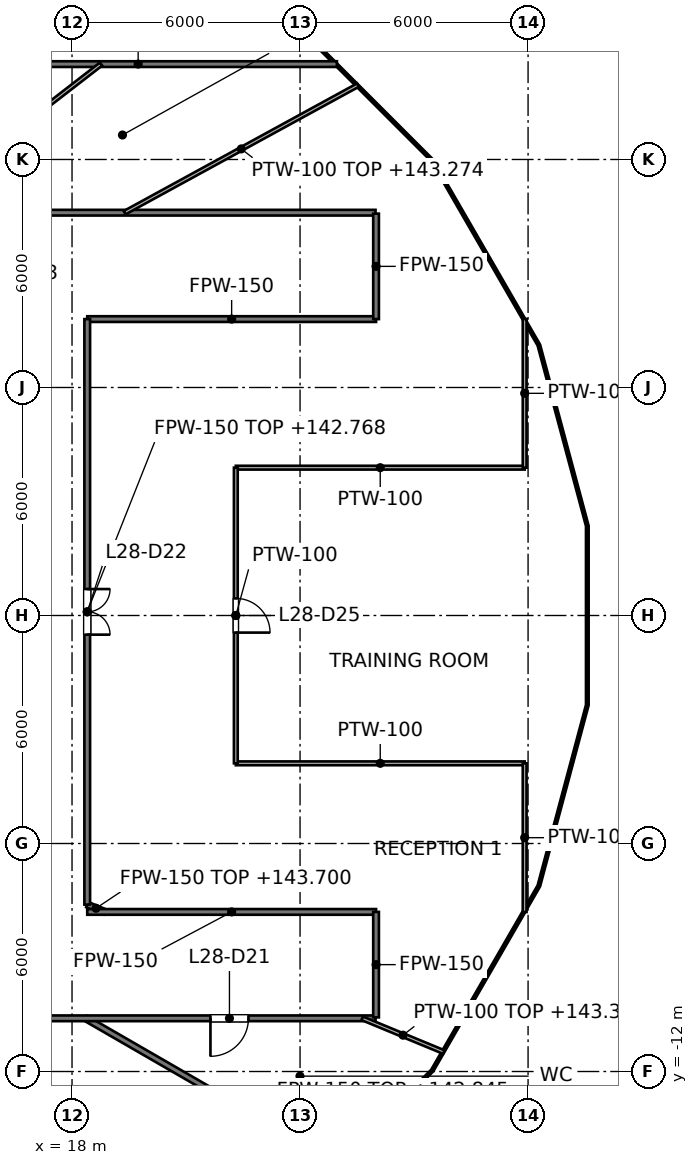
"""IFC4 building model, lengths in metres.
Left out: names, types, materials, properties, quantities, classifications, styles, units other than length and angle.
Written with IfcOpenShell. Run it as: python <this file> out.ifc"""

import sys

from ifc_helpers import new_model, si_unit, direction, frame, frame_2d, origin, place, context, subcontext, project, spatial, rectangle, extrude, element, fill, save


model = new_model("IFC4")
c1 = context("Model", 3, precision=1e-05, world=origin(), true_north=direction((0.0, 1.0)))
c2 = subcontext(c1, "Body", "Model", "MODEL_VIEW")
j1 = project(units=[si_unit("LENGTHUNIT", "METRE"), si_unit("PLANEANGLEUNIT", "RADIAN")], contexts=[c1])
p1 = place(None, origin())
s1 = spatial("IfcSite", under=j1, at=p1, CompositionType="ELEMENT")
p2 = place(p1, origin())
s2 = spatial("IfcBuilding", under=s1, at=p2, CompositionType="ELEMENT")
p3 = place(p2, frame((0.0, 0.0, 139.8)))
s3 = spatial("IfcBuildingStorey", under=s2, at=p3, CompositionType="ELEMENT", Elevation=139.8)
p4 = place(p3, frame((18.359, -10.6, 0.0), z_axis=(0.0, 0.0, 1.0), x_axis=(0.866036201792, -0.499981296836, 0.0)))
e1 = element("IfcWall", 1, at=p4, inside=s3, PredefinedType="PARTITIONING", context=c2, shape_type="SweptSolid", body=[
    extrude(rectangle(XDim=7.702, YDim=0.15, at=frame_2d((3.851, 0.0))), origin(), (0.0, 0.0, 1.0), 3.045),
])
p5 = place(p3, frame((18.4, -7.608, 0.0), z_axis=(0.0, 0.0, 1.0), x_axis=(0.923666464005, -0.383197420755, 0.0)))
e2 = element("IfcWall", 2, at=p5, inside=s3, PredefinedType="PARTITIONING", context=c2, shape_type="SweptSolid", body=[
    extrude(rectangle(XDim=0.501, YDim=0.15, at=frame_2d((0.251, 0.0))), origin(), (0.0, 0.0, 1.0), 3.9),
])
p6 = place(p3, frame((-25.986, -10.6, 0.0), z_axis=(0.0, 0.0, 1.0), x_axis=(1.0, 0.0, 0.0)))
e3 = element("IfcWall", 3, at=p6, inside=s3, PredefinedType="PARTITIONING", context=c2, shape_type="SweptSolid", body=[
    extrude(rectangle(XDim=51.972, YDim=0.15, at=frame_2d((25.986, 0.0))), origin(), (0.0, 0.0, 1.0), 2.968),
])
p7 = place(p6, frame((47.628, 0.0, 0.0)))
e4 = element("IfcOpeningElement", 4, at=p7, cuts=e3, PredefinedType="OPENING", context=c2, shape_type="SweptSolid", body=[
    extrude(rectangle(XDim=1.0, YDim=2.1, at=frame_2d((0.5, 1.05))), frame((0.0, 0.075, 0.0), z_axis=(0.0, -1.0, 0.0), x_axis=(1.0, 0.0, 0.0)), (0.0, 0.0, 1.0), 0.15),
])
p8 = place(p6, frame((5.312, 0.0, 0.0)))
e5 = element("IfcOpeningElement", 5, at=p8, cuts=e3, PredefinedType="OPENING", context=c2, shape_type="SweptSolid", body=[
    extrude(rectangle(XDim=1.0, YDim=2.1, at=frame_2d((0.5, 1.05))), frame((0.0, 0.075, 0.0), z_axis=(0.0, -1.0, 0.0), x_axis=(1.0, 0.0, 0.0)), (0.0, 0.0, 1.0), 0.15),
])
p9 = place(p6, frame((14.924, 0.0, 0.0)))
e6 = element("IfcOpeningElement", 6, at=p9, cuts=e3, PredefinedType="OPENING", context=c2, shape_type="SweptSolid", body=[
    extrude(rectangle(XDim=1.0, YDim=2.1, at=frame_2d((0.5, 1.05))), frame((0.0, 0.075, 0.0), z_axis=(0.0, -1.0, 0.0), x_axis=(1.0, 0.0, 0.0)), (0.0, 0.0, 1.0), 0.15),
])
p10 = place(p6, frame((22.156, 0.0, 0.0)))
e7 = element("IfcOpeningElement", 7, at=p10, cuts=e3, PredefinedType="OPENING", context=c2, shape_type="SweptSolid", body=[
    extrude(rectangle(XDim=1.0, YDim=2.1, at=frame_2d((0.5, 1.05))), frame((0.0, 0.075, 0.0), z_axis=(0.0, -1.0, 0.0), x_axis=(1.0, 0.0, 0.0)), (0.0, 0.0, 1.0), 0.15),
])
p11 = place(p6, frame((27.795, 0.0, 0.0)))
e8 = element("IfcOpeningElement", 8, at=p11, cuts=e3, PredefinedType="OPENING", context=c2, shape_type="SweptSolid", body=[
    extrude(rectangle(XDim=1.0, YDim=2.1, at=frame_2d((0.5, 1.05))), frame((0.0, 0.075, 0.0), z_axis=(0.0, -1.0, 0.0), x_axis=(1.0, 0.0, 0.0)), (0.0, 0.0, 1.0), 0.15),
])
p12 = place(p6, frame((37.045, 0.0, 0.0)))
e9 = element("IfcOpeningElement", 9, at=p12, cuts=e3, PredefinedType="OPENING", context=c2, shape_type="SweptSolid", body=[
    extrude(rectangle(XDim=1.0, YDim=2.1, at=frame_2d((0.5, 1.05))), frame((0.0, 0.075, 0.0), z_axis=(0.0, -1.0, 0.0), x_axis=(1.0, 0.0, 0.0)), (0.0, 0.0, 1.0), 0.15),
])
for number, where, z_axis, x_axis in (
    (10, (18.4, -7.8, 0.0), (0.0, 0.0, 1.0), (1.0, 0.0, 0.0)),
    (11, (18.4, 7.8, 0.0), (0.0, 0.0, 1.0), (1.0, 0.0, 0.0)),
):
    element("IfcWall", number, at=place(p3, frame(where, z_axis=z_axis, x_axis=x_axis)), inside=s3, PredefinedType="PARTITIONING", context=c2, shape_type="SweptSolid", body=[
        extrude(rectangle(XDim=7.6, YDim=0.15, at=frame_2d((3.8, 0.0))), origin(), (0.0, 0.0, 1.0), 2.977),
    ])
p13 = place(p3, frame((-25.986, 10.6, 0.0), z_axis=(0.0, 0.0, 1.0), x_axis=(1.0, 0.0, 0.0)))
e12 = element("IfcWall", 12, at=p13, inside=s3, PredefinedType="PARTITIONING", context=c2, shape_type="SweptSolid", body=[
    extrude(rectangle(XDim=51.972, YDim=0.15, at=frame_2d((25.986, 0.0))), origin(), (0.0, 0.0, 1.0), 2.968),
])
p14 = place(p13, frame((42.031, 0.0, 0.0)))
e13 = element("IfcOpeningElement", 13, at=p14, cuts=e12, PredefinedType="OPENING", context=c2, shape_type="SweptSolid", body=[
    extrude(rectangle(XDim=1.0, YDim=2.1, at=frame_2d((0.5, 1.05))), frame((0.0, 0.075, 0.0), z_axis=(0.0, -1.0, 0.0), x_axis=(1.0, 0.0, 0.0)), (0.0, 0.0, 1.0), 0.15),
])
p15 = place(p13, frame((37.69, 0.0, 0.0)))
e14 = element("IfcOpeningElement", 14, at=p15, cuts=e12, PredefinedType="OPENING", context=c2, shape_type="SweptSolid", body=[
    extrude(rectangle(XDim=1.0, YDim=2.1, at=frame_2d((0.5, 1.05))), frame((0.0, 0.075, 0.0), z_axis=(0.0, -1.0, 0.0), x_axis=(1.0, 0.0, 0.0)), (0.0, 0.0, 1.0), 0.15),
])
p16 = place(p13, frame((32.156, 0.0, 0.0)))
e15 = element("IfcOpeningElement", 15, at=p16, cuts=e12, PredefinedType="OPENING", context=c2, shape_type="SweptSolid", body=[
    extrude(rectangle(XDim=1.0, YDim=2.1, at=frame_2d((0.5, 1.05))), frame((0.0, 0.075, 0.0), z_axis=(0.0, -1.0, 0.0), x_axis=(1.0, 0.0, 0.0)), (0.0, 0.0, 1.0), 0.15),
])
p17 = place(p13, frame((23.896, 0.0, 0.0)))
e16 = element("IfcOpeningElement", 16, at=p17, cuts=e12, PredefinedType="OPENING", context=c2, shape_type="SweptSolid", body=[
    extrude(rectangle(XDim=1.0, YDim=2.1, at=frame_2d((0.5, 1.05))), frame((0.0, 0.075, 0.0), z_axis=(0.0, -1.0, 0.0), x_axis=(1.0, 0.0, 0.0)), (0.0, 0.0, 1.0), 0.15),
])
p18 = place(p13, frame((13.126, 0.0, 0.0)))
e17 = element("IfcOpeningElement", 17, at=p18, cuts=e12, PredefinedType="OPENING", context=c2, shape_type="SweptSolid", body=[
    extrude(rectangle(XDim=1.2, YDim=2.1, at=frame_2d((0.6, 1.05))), frame((0.0, 0.075, 0.0), z_axis=(0.0, -1.0, 0.0), x_axis=(1.0, 0.0, 0.0)), (0.0, 0.0, 1.0), 0.15),
])
p19 = place(p3, frame((14.51, 14.51, 0.0), z_axis=(0.0, 0.0, 1.0), x_axis=(1.0, 0.0, 0.0)))
e18 = element("IfcWall", 18, at=p19, inside=s3, PredefinedType="PARTITIONING", context=c2, shape_type="SweptSolid", body=[
    extrude(rectangle(XDim=10.46, YDim=0.15, at=frame_2d((5.23, 0.0))), origin(), (0.0, 0.0, 1.0), 2.968),
])
for number, where, z_axis, x_axis in (
    (19, (26.0, -10.575, 0.0), (0.0, 0.0, 1.0), (0.0, 1.0, 0.0)),
    (20, (26.0, 7.8, 0.0), (0.0, 0.0, 1.0), (0.0, 1.0, 0.0)),
):
    element("IfcWall", number, at=place(p3, frame(where, z_axis=z_axis, x_axis=x_axis)), inside=s3, PredefinedType="PARTITIONING", context=c2, shape_type="SweptSolid", body=[
        extrude(rectangle(XDim=2.775, YDim=0.15, at=frame_2d((1.387, 0.0))), origin(), (0.0, 0.0, 1.0), 2.977),
    ])
p20 = place(p3, frame((18.4, -7.608, 0.0), z_axis=(0.0, 0.0, 1.0), x_axis=(0.0, 1.0, 0.0)))
e21 = element("IfcWall", 21, at=p20, inside=s3, PredefinedType="PARTITIONING", context=c2, shape_type="SweptSolid", body=[
    extrude(rectangle(XDim=15.408, YDim=0.15, at=frame_2d((7.704, 0.0))), origin(), (0.0, 0.0, 1.0), 2.968),
])
p21 = place(p20, frame((7.104, 0.0, 0.0)))
e22 = element("IfcOpeningElement", 22, at=p21, cuts=e21, PredefinedType="OPENING", context=c2, shape_type="SweptSolid", body=[
    extrude(rectangle(XDim=1.2, YDim=2.1, at=frame_2d((0.6, 1.05))), frame((0.0, 0.075, 0.0), z_axis=(0.0, -1.0, 0.0), x_axis=(1.0, 0.0, 0.0)), (0.0, 0.0, 1.0), 0.15),
])
p22 = place(p3, frame((25.635, -10.6, 0.0), z_axis=(0.0, 0.0, 1.0), x_axis=(0.924087226733, -0.382181628796, 0.0)))
e23 = element("IfcWall", 23, at=p22, inside=s3, PredefinedType="PARTITIONING", context=c2, shape_type="SweptSolid", body=[
    extrude(rectangle(XDim=2.323, YDim=0.1, at=frame_2d((1.162, 0.0))), origin(), (0.0, 0.0, 1.0), 3.525),
])
for number, where, z_axis, x_axis in (
    (24, (22.31, -3.89, 0.0), (0.0, 0.0, 1.0), (1.0, 0.0, 0.0)),
    (25, (22.31, 3.89, 0.0), (0.0, 0.0, 1.0), (1.0, 0.0, 0.0)),
):
    element("IfcWall", number, at=place(p3, frame(where, z_axis=z_axis, x_axis=x_axis)), inside=s3, PredefinedType="PARTITIONING", context=c2, shape_type="SweptSolid", body=[
        extrude(rectangle(XDim=7.6, YDim=0.1, at=frame_2d((3.8, 0.0))), origin(), (0.0, 0.0, 1.0), 2.968),
    ])
p23 = place(p3, frame((19.384, 10.6, 0.0), z_axis=(0.0, 0.0, 1.0), x_axis=(0.877388352769, 0.479780865006, 0.0)))
e26 = element("IfcWall", 26, at=p23, inside=s3, PredefinedType="PARTITIONING", context=c2, shape_type="SweptSolid", body=[
    extrude(rectangle(XDim=6.997, YDim=0.1, at=frame_2d((3.499, 0.0))), origin(), (0.0, 0.0, 1.0), 3.474),
])
p24 = place(p3, frame((13.707, 10.6, 0.0), z_axis=(0.0, 0.0, 1.0), x_axis=(0.791052244704, 0.611748597177, 0.0)))
e27 = element("IfcWall", 27, at=p24, inside=s3, PredefinedType="PARTITIONING", context=c2, shape_type="SweptSolid", body=[
    extrude(rectangle(XDim=6.391, YDim=0.1, at=frame_2d((3.196, 0.0))), origin(), (0.0, 0.0, 1.0), 3.9),
])
for number, where, z_axis, x_axis in (
    (28, (29.91, -7.803, 0.0), (0.0, 0.0, 1.0), (0.0, 1.0, 0.0)),
    (29, (29.91, 3.89, 0.0), (0.0, 0.0, 1.0), (0.0, 1.0, 0.0)),
):
    element("IfcWall", number, at=place(p3, frame(where, z_axis=z_axis, x_axis=x_axis)), inside=s3, PredefinedType="PARTITIONING", context=c2, shape_type="SweptSolid", body=[
        extrude(rectangle(XDim=3.913, YDim=0.1, at=frame_2d((1.957, 0.0))), origin(), (0.0, 0.0, 1.0), 2.968),
    ])
p25 = place(p3, frame((22.31, -3.89, 0.0), z_axis=(0.0, 0.0, 1.0), x_axis=(0.0, 1.0, 0.0)))
e30 = element("IfcWall", 30, at=p25, inside=s3, PredefinedType="PARTITIONING", context=c2, shape_type="SweptSolid", body=[
    extrude(rectangle(XDim=7.78, YDim=0.1, at=frame_2d((3.89, 0.0))), origin(), (0.0, 0.0, 1.0), 2.968),
])
p26 = place(p25, frame((3.44, 0.0, 0.0)))
e31 = element("IfcOpeningElement", 31, at=p26, cuts=e30, PredefinedType="OPENING", context=c2, shape_type="SweptSolid", body=[
    extrude(rectangle(XDim=0.9, YDim=2.1, at=frame_2d((0.45, 1.05))), frame((0.0, 0.05, 0.0), z_axis=(0.0, -1.0, 0.0), x_axis=(1.0, 0.0, 0.0)), (0.0, 0.0, 1.0), 0.1),
])
p27 = place(p7, origin())
e32 = element("IfcDoor", 32, at=p27, inside=s3, OperationType="SINGLE_SWING_LEFT", PredefinedType="DOOR", context=c2, shape_type="SweptSolid", body=[
    extrude(rectangle(XDim=1.0, YDim=2.1, at=frame_2d((0.5, 1.05))), frame((0.0, 0.025, 0.0), z_axis=(0.0, -1.0, 0.0), x_axis=(1.0, 0.0, 0.0)), (0.0, 0.0, 1.0), 0.05),
])
fill(e4, e32)
p28 = place(p21, origin())
e33 = element("IfcDoor", 33, at=p28, inside=s3, OperationType="DOUBLE_DOOR_SINGLE_SWING", PredefinedType="DOOR", context=c2, shape_type="SweptSolid", body=[
    extrude(rectangle(XDim=1.2, YDim=2.1, at=frame_2d((0.6, 1.05))), frame((0.0, 0.025, 0.0), z_axis=(0.0, -1.0, 0.0), x_axis=(1.0, 0.0, 0.0)), (0.0, 0.0, 1.0), 0.05),
])
fill(e22, e33)
p29 = place(p26, origin())
e34 = element("IfcDoor", 34, at=p29, inside=s3, OperationType="SINGLE_SWING_LEFT", PredefinedType="DOOR", context=c2, shape_type="SweptSolid", body=[
    extrude(rectangle(XDim=0.9, YDim=2.1, at=frame_2d((0.45, 1.05))), frame((0.0, 0.025, 0.0), z_axis=(0.0, -1.0, 0.0), x_axis=(1.0, 0.0, 0.0)), (0.0, 0.0, 1.0), 0.05),
])
fill(e31, e34)
save(model, sys.argv[1])
